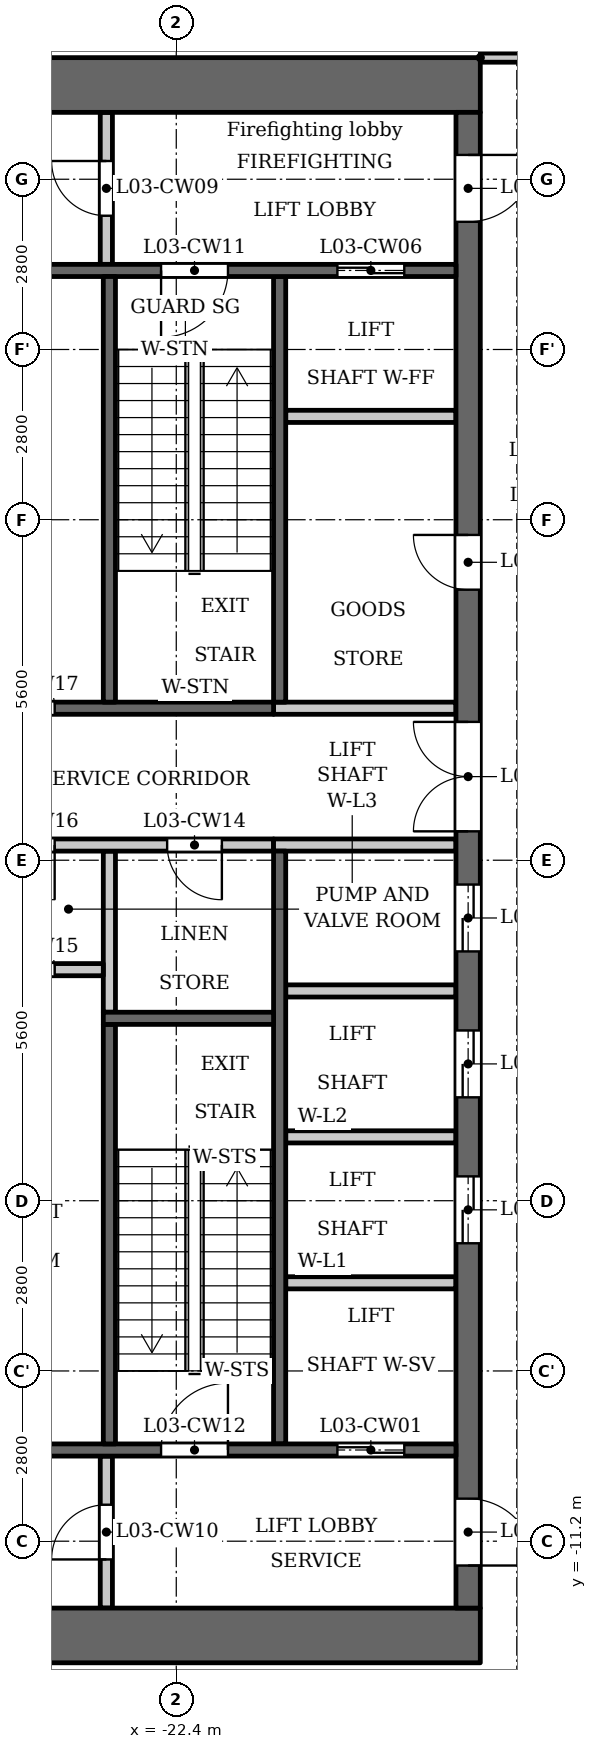
"""IFC4 building model, lengths in metres.
Left out: names, types, materials, properties, quantities, classifications, styles, units other than length and angle.
Written with IfcOpenShell. Run it as: python <this file> out.ifc"""

import sys

from ifc_helpers import new_model, si_unit, direction, frame, frame_2d, origin, place, context, subcontext, project, spatial, rectangle, extrude, element, fill, save


model = new_model("IFC4")
c1 = context("Model", 3, precision=1e-05, world=origin(), true_north=direction((0.0, 1.0)))
c2 = subcontext(c1, "Body", "Model", "MODEL_VIEW")
j1 = project(units=[si_unit("LENGTHUNIT", "METRE"), si_unit("PLANEANGLEUNIT", "RADIAN")], contexts=[c1])
p1 = place(None, origin())
s1 = spatial("IfcSite", under=j1, at=p1, CompositionType="ELEMENT")
p2 = place(p1, origin())
s2 = spatial("IfcBuilding", under=s1, at=p2, CompositionType="ELEMENT")
p3 = place(p2, frame((0.0, 0.0, 16.1)))
s3 = spatial("IfcBuildingStorey", under=s2, at=p3, CompositionType="ELEMENT", Elevation=16.1)
p4 = place(p3, frame((-23.5, -2.5, 0.0), z_axis=(0.0, 0.0, 1.0), x_axis=(0.0, 1.0, 0.0)))
e1 = element("IfcWall", 1, at=p4, inside=s3, PredefinedType="PARTITIONING", context=c2, shape_type="SweptSolid", body=[
    extrude(rectangle(XDim=2.65, YDim=0.2, at=frame_2d((1.325, 0.0))), origin(), (0.0, 0.0, 1.0), 4.45),
])
p5 = place(p3, frame((-20.7, 2.6, 0.0), z_axis=(0.0, 0.0, 1.0), x_axis=(0.0, 1.0, 0.0)))
e2 = element("IfcWall", 2, at=p5, inside=s3, PredefinedType="SHEAR", context=c2, shape_type="SweptSolid", body=[
    extrude(rectangle(XDim=7.0, YDim=0.2, at=frame_2d((3.5, 0.0))), origin(), (0.0, 0.0, 1.0), 4.45),
])
p6 = place(p3, frame((-20.7, -9.6, 0.0), z_axis=(0.0, 0.0, 1.0), x_axis=(0.0, 1.0, 0.0)))
e3 = element("IfcWall", 3, at=p6, inside=s3, PredefinedType="SHEAR", context=c2, shape_type="SweptSolid", body=[
    extrude(rectangle(XDim=9.75, YDim=0.2, at=frame_2d((4.875, 0.0))), origin(), (0.0, 0.0, 1.0), 4.45),
])
p7 = place(p3, frame((-20.8, 2.5, 0.0), z_axis=(0.0, 0.0, 1.0), x_axis=(-1.0, 0.0, 0.0)))
e4 = element("IfcWall", 4, at=p7, inside=s3, PredefinedType="SHEAR", context=c2, shape_type="SweptSolid", body=[
    extrude(rectangle(XDim=5.3, YDim=0.2, at=frame_2d((2.65, 0.0))), origin(), (0.0, 0.0, 1.0), 4.45),
])
p8 = place(p7, frame((3.6, 0.0, 0.0)))
e5 = element("IfcOpeningElement", 5, at=p8, cuts=e4, PredefinedType="OPENING", context=c2, shape_type="SweptSolid", body=[
    extrude(rectangle(XDim=0.9, YDim=2.1, at=frame_2d((0.45, 1.05))), frame((0.0, 0.11, 0.0), z_axis=(0.0, -1.0, 0.0), x_axis=(1.0, 0.0, 0.0)), (0.0, 0.0, 1.0), 0.22),
])
p9 = place(p3, frame((-20.8, 0.25, 0.0), z_axis=(0.0, 0.0, 1.0), x_axis=(-1.0, 0.0, 0.0)))
e6 = element("IfcWall", 6, at=p9, inside=s3, PredefinedType="PARTITIONING", context=c2, shape_type="SweptSolid", body=[
    extrude(rectangle(XDim=5.3, YDim=0.2, at=frame_2d((2.65, 0.0))), origin(), (0.0, 0.0, 1.0), 4.45),
])
p10 = place(p9, frame((0.85, 0.0, 0.0)))
e7 = element("IfcOpeningElement", 7, at=p10, cuts=e6, PredefinedType="OPENING", context=c2, shape_type="SweptSolid", body=[
    extrude(rectangle(XDim=0.9, YDim=2.1, at=frame_2d((0.45, 1.05))), frame((0.0, 0.11, 0.0), z_axis=(0.0, -1.0, 0.0), x_axis=(1.0, 0.0, 0.0)), (0.0, 0.0, 1.0), 0.22),
])
p11 = place(p9, frame((3.6, 0.0, 0.0)))
e8 = element("IfcOpeningElement", 8, at=p11, cuts=e6, PredefinedType="OPENING", context=c2, shape_type="SweptSolid", body=[
    extrude(rectangle(XDim=0.9, YDim=2.1, at=frame_2d((0.45, 1.05))), frame((0.0, 0.11, 0.0), z_axis=(0.0, -1.0, 0.0), x_axis=(1.0, 0.0, 0.0)), (0.0, 0.0, 1.0), 0.22),
])
for number, where, z_axis, x_axis in (
    (9, (-17.4, 12.75, 0.0), (0.0, 0.0, 1.0), (-1.0, 0.0, 0.0)),
    (10, (-17.4, -12.75, 0.0), (0.0, 0.0, 1.0), (-1.0, 0.0, 0.0)),
):
    element("IfcWall", number, at=place(p3, frame(where, z_axis=z_axis, x_axis=x_axis)), inside=s3, PredefinedType="SHEAR", context=c2, shape_type="SweptSolid", body=[
        extrude(rectangle(XDim=10.4, YDim=0.9, at=frame_2d((5.2, 0.0))), origin(), (0.0, 0.0, 1.0), 4.45),
    ])
p12 = place(p3, frame((-17.6, -12.3, 0.0), z_axis=(0.0, 0.0, 1.0), x_axis=(0.0, 1.0, 0.0)))
e11 = element("IfcWall", 11, at=p12, inside=s3, PredefinedType="SHEAR", context=c2, shape_type="SweptSolid", body=[
    extrude(rectangle(XDim=24.6, YDim=0.4, at=frame_2d((12.3, 0.0))), origin(), (0.0, 0.0, 1.0), 4.45),
])
p13 = place(p12, frame((6.0, 0.0, 0.0)))
e12 = element("IfcOpeningElement", 12, at=p13, cuts=e11, PredefinedType="OPENING", context=c2, shape_type="SweptSolid", body=[
    extrude(rectangle(XDim=1.1, YDim=2.1, at=frame_2d((0.55, 1.05))), frame((0.0, 0.21, 0.0), z_axis=(0.0, -1.0, 0.0), x_axis=(1.0, 0.0, 0.0)), (0.0, 0.0, 1.0), 0.42),
])
p14 = place(p12, frame((8.4, 0.0, 0.0)))
e13 = element("IfcOpeningElement", 13, at=p14, cuts=e11, PredefinedType="OPENING", context=c2, shape_type="SweptSolid", body=[
    extrude(rectangle(XDim=1.1, YDim=2.1, at=frame_2d((0.55, 1.05))), frame((0.0, 0.21, 0.0), z_axis=(0.0, -1.0, 0.0), x_axis=(1.0, 0.0, 0.0)), (0.0, 0.0, 1.0), 0.42),
])
p15 = place(p12, frame((10.8, 0.0, 0.0)))
e14 = element("IfcOpeningElement", 14, at=p15, cuts=e11, PredefinedType="OPENING", context=c2, shape_type="SweptSolid", body=[
    extrude(rectangle(XDim=1.1, YDim=2.1, at=frame_2d((0.55, 1.05))), frame((0.0, 0.21, 0.0), z_axis=(0.0, -1.0, 0.0), x_axis=(1.0, 0.0, 0.0)), (0.0, 0.0, 1.0), 0.42),
])
p16 = place(p12, frame((16.75, 0.0, 0.0)))
e15 = element("IfcOpeningElement", 15, at=p16, cuts=e11, PredefinedType="OPENING", context=c2, shape_type="SweptSolid", body=[
    extrude(rectangle(XDim=0.9, YDim=2.1, at=frame_2d((0.45, 1.05))), frame((0.0, 0.21, 0.0), z_axis=(0.0, -1.0, 0.0), x_axis=(1.0, 0.0, 0.0)), (0.0, 0.0, 1.0), 0.42),
])
p17 = place(p12, frame((22.8, 0.0, 0.0)))
e16 = element("IfcOpeningElement", 16, at=p17, cuts=e11, PredefinedType="OPENING", context=c2, shape_type="SweptSolid", body=[
    extrude(rectangle(XDim=1.1, YDim=2.1, at=frame_2d((0.55, 1.05))), frame((0.0, 0.21, 0.0), z_axis=(0.0, -1.0, 0.0), x_axis=(1.0, 0.0, 0.0)), (0.0, 0.0, 1.0), 0.42),
])
p18 = place(p12, frame((0.7, 0.0, 0.0)))
e17 = element("IfcOpeningElement", 17, at=p18, cuts=e11, PredefinedType="OPENING", context=c2, shape_type="SweptSolid", body=[
    extrude(rectangle(XDim=1.1, YDim=2.1, at=frame_2d((0.55, 1.05))), frame((0.0, 0.21, 0.0), z_axis=(0.0, -1.0, 0.0), x_axis=(1.0, 0.0, 0.0)), (0.0, 0.0, 1.0), 0.42),
])
p19 = place(p12, frame((12.775, 0.0, 0.0)))
e18 = element("IfcOpeningElement", 18, at=p19, cuts=e11, PredefinedType="OPENING", context=c2, shape_type="SweptSolid", body=[
    extrude(rectangle(XDim=1.8, YDim=2.1, at=frame_2d((0.9, 1.05))), frame((0.0, 0.21, 0.0), z_axis=(0.0, -1.0, 0.0), x_axis=(1.0, 0.0, 0.0)), (0.0, 0.0, 1.0), 0.42),
])
p20 = place(p3, frame((-23.55, 9.8, 0.0), z_axis=(0.0, 0.0, 1.0), x_axis=(0.0, 1.0, 0.0)))
e19 = element("IfcWall", 19, at=p20, inside=s3, PredefinedType="PARTITIONING", context=c2, shape_type="SweptSolid", body=[
    extrude(rectangle(XDim=2.5, YDim=0.2, at=frame_2d((1.25, 0.0))), origin(), (0.0, 0.0, 1.0), 4.45),
])
p21 = place(p20, frame((0.8, 0.0, 0.0)))
e20 = element("IfcOpeningElement", 20, at=p21, cuts=e19, PredefinedType="OPENING", context=c2, shape_type="SweptSolid", body=[
    extrude(rectangle(XDim=0.9, YDim=2.1, at=frame_2d((0.45, 1.05))), frame((0.0, 0.11, 0.0), z_axis=(0.0, -1.0, 0.0), x_axis=(1.0, 0.0, 0.0)), (0.0, 0.0, 1.0), 0.22),
])
p22 = place(p3, frame((-23.55, -12.3, 0.0), z_axis=(0.0, 0.0, 1.0), x_axis=(0.0, 1.0, 0.0)))
e21 = element("IfcWall", 21, at=p22, inside=s3, PredefinedType="PARTITIONING", context=c2, shape_type="SweptSolid", body=[
    extrude(rectangle(XDim=2.5, YDim=0.2, at=frame_2d((1.25, 0.0))), origin(), (0.0, 0.0, 1.0), 4.45),
])
p23 = place(p22, frame((0.8, 0.0, 0.0)))
e22 = element("IfcOpeningElement", 22, at=p23, cuts=e21, PredefinedType="OPENING", context=c2, shape_type="SweptSolid", body=[
    extrude(rectangle(XDim=0.9, YDim=2.1, at=frame_2d((0.45, 1.05))), frame((0.0, 0.11, 0.0), z_axis=(0.0, -1.0, 0.0), x_axis=(1.0, 0.0, 0.0)), (0.0, 0.0, 1.0), 0.22),
])
p24 = place(p3, frame((-23.6, -1.8, 0.0), z_axis=(0.0, 0.0, 1.0), x_axis=(-1.0, 0.0, 0.0)))
e23 = element("IfcWall", 23, at=p24, inside=s3, PredefinedType="PARTITIONING", context=c2, shape_type="SweptSolid", body=[
    extrude(rectangle(XDim=2.5, YDim=0.2, at=frame_2d((1.25, 0.0))), origin(), (0.0, 0.0, 1.0), 4.45),
])
p25 = place(p24, frame((0.8, 0.0, 0.0)))
e24 = element("IfcOpeningElement", 24, at=p25, cuts=e23, PredefinedType="OPENING", context=c2, shape_type="SweptSolid", body=[
    extrude(rectangle(XDim=0.9, YDim=2.1, at=frame_2d((0.45, 1.05))), frame((0.0, 0.11, 0.0), z_axis=(0.0, -1.0, 0.0), x_axis=(1.0, 0.0, 0.0)), (0.0, 0.0, 1.0), 0.22),
])
p26 = place(p3, frame((-17.8, -9.7, 0.0), z_axis=(0.0, 0.0, 1.0), x_axis=(-1.0, 0.0, 0.0)))
e25 = element("IfcWall", 25, at=p26, inside=s3, PredefinedType="SHEAR", context=c2, shape_type="SweptSolid", body=[
    extrude(rectangle(XDim=8.3, YDim=0.2, at=frame_2d((4.15, 0.0))), origin(), (0.0, 0.0, 1.0), 4.45),
])
p27 = place(p26, frame((0.85, 0.0, 0.0)))
e26 = element("IfcOpeningElement", 26, at=p27, cuts=e25, PredefinedType="OPENING", context=c2, shape_type="SweptSolid", body=[
    extrude(rectangle(XDim=1.1, YDim=2.1, at=frame_2d((0.55, 1.05))), frame((0.0, 0.11, 0.0), z_axis=(0.0, -1.0, 0.0), x_axis=(1.0, 0.0, 0.0)), (0.0, 0.0, 1.0), 0.22),
])
p28 = place(p26, frame((3.75, 0.0, 0.0)))
e27 = element("IfcOpeningElement", 27, at=p28, cuts=e25, PredefinedType="OPENING", context=c2, shape_type="SweptSolid", body=[
    extrude(rectangle(XDim=1.1, YDim=2.1, at=frame_2d((0.55, 1.05))), frame((0.0, 0.11, 0.0), z_axis=(0.0, -1.0, 0.0), x_axis=(1.0, 0.0, 0.0)), (0.0, 0.0, 1.0), 0.22),
])
for number, where, z_axis, x_axis in (
    (28, (-17.8, -6.95, 0.0), (0.0, 0.0, 1.0), (-1.0, 0.0, 0.0)),
    (29, (-17.8, -4.55, 0.0), (0.0, 0.0, 1.0), (-1.0, 0.0, 0.0)),
    (30, (-17.8, -2.15, 0.0), (0.0, 0.0, 1.0), (-1.0, 0.0, 0.0)),
):
    element("IfcWall", number, at=place(p3, frame(where, z_axis=z_axis, x_axis=x_axis)), inside=s3, PredefinedType="PARTITIONING", context=c2, shape_type="SweptSolid", body=[
        extrude(rectangle(XDim=2.8, YDim=0.2, at=frame_2d((1.4, 0.0))), origin(), (0.0, 0.0, 1.0), 4.45),
    ])
for number, where, z_axis, x_axis in (
    (31, (-17.8, 0.25, 0.0), (0.0, 0.0, 1.0), (-1.0, 0.0, 0.0)),
    (32, (-17.8, 2.5, 0.0), (0.0, 0.0, 1.0), (-1.0, 0.0, 0.0)),
):
    element("IfcWall", number, at=place(p3, frame(where, z_axis=z_axis, x_axis=x_axis)), inside=s3, PredefinedType="PARTITIONING", context=c2, shape_type="SweptSolid", body=[
        extrude(rectangle(XDim=3.0, YDim=0.2, at=frame_2d((1.5, 0.0))), origin(), (0.0, 0.0, 1.0), 4.45),
    ])
p29 = place(p3, frame((-17.8, 7.3, 0.0), z_axis=(0.0, 0.0, 1.0), x_axis=(-1.0, 0.0, 0.0)))
e33 = element("IfcWall", 33, at=p29, inside=s3, PredefinedType="PARTITIONING", context=c2, shape_type="SweptSolid", body=[
    extrude(rectangle(XDim=2.8, YDim=0.2, at=frame_2d((1.4, 0.0))), origin(), (0.0, 0.0, 1.0), 4.45),
])
p30 = place(p3, frame((-17.8, 9.7, 0.0), z_axis=(0.0, 0.0, 1.0), x_axis=(-1.0, 0.0, 0.0)))
e34 = element("IfcWall", 34, at=p30, inside=s3, PredefinedType="SHEAR", context=c2, shape_type="SweptSolid", body=[
    extrude(rectangle(XDim=8.3, YDim=0.2, at=frame_2d((4.15, 0.0))), origin(), (0.0, 0.0, 1.0), 4.45),
])
p31 = place(p30, frame((0.85, 0.0, 0.0)))
e35 = element("IfcOpeningElement", 35, at=p31, cuts=e34, PredefinedType="OPENING", context=c2, shape_type="SweptSolid", body=[
    extrude(rectangle(XDim=1.1, YDim=2.1, at=frame_2d((0.55, 1.05))), frame((0.0, 0.11, 0.0), z_axis=(0.0, -1.0, 0.0), x_axis=(1.0, 0.0, 0.0)), (0.0, 0.0, 1.0), 0.22),
])
p32 = place(p30, frame((3.75, 0.0, 0.0)))
e36 = element("IfcOpeningElement", 36, at=p32, cuts=e34, PredefinedType="OPENING", context=c2, shape_type="SweptSolid", body=[
    extrude(rectangle(XDim=1.1, YDim=2.1, at=frame_2d((0.55, 1.05))), frame((0.0, 0.11, 0.0), z_axis=(0.0, -1.0, 0.0), x_axis=(1.0, 0.0, 0.0)), (0.0, 0.0, 1.0), 0.22),
])
p33 = place(p3, frame((-23.5, 2.6, 0.0), z_axis=(0.0, 0.0, 1.0), x_axis=(0.0, 1.0, 0.0)))
e37 = element("IfcWall", 37, at=p33, inside=s3, PredefinedType="SHEAR", context=c2, shape_type="SweptSolid", body=[
    extrude(rectangle(XDim=7.0, YDim=0.2, at=frame_2d((3.5, 0.0))), origin(), (0.0, 0.0, 1.0), 4.45),
])
p34 = place(p3, frame((-23.5, -9.6, 0.0), z_axis=(0.0, 0.0, 1.0), x_axis=(0.0, 1.0, 0.0)))
e38 = element("IfcWall", 38, at=p34, inside=s3, PredefinedType="SHEAR", context=c2, shape_type="SweptSolid", body=[
    extrude(rectangle(XDim=6.9, YDim=0.2, at=frame_2d((3.45, 0.0))), origin(), (0.0, 0.0, 1.0), 4.45),
])
p35 = place(p3, frame((-20.8, -2.6, 0.0), z_axis=(0.0, 0.0, 1.0), x_axis=(-1.0, 0.0, 0.0)))
e39 = element("IfcWall", 39, at=p35, inside=s3, PredefinedType="SHEAR", context=c2, shape_type="SweptSolid", body=[
    extrude(rectangle(XDim=2.8, YDim=0.2, at=frame_2d((1.4, 0.0))), origin(), (0.0, 0.0, 1.0), 4.45),
])
p36 = place(p3, frame((-17.4, 13.2, 0.0), z_axis=(0.0, 0.0, 1.0), x_axis=(1.0, 0.0, 0.0)))
e40 = element("IfcWall", 40, at=p36, inside=s3, PredefinedType="PARTITIONING", context=c2, shape_type="SweptSolid", body=[
    extrude(rectangle(XDim=34.8, YDim=0.15, at=frame_2d((17.4, 0.0))), origin(), (0.0, 0.0, 1.0), 4.45),
])
p37 = place(p36, frame((3.05, 0.0, 0.0)))
e41 = element("IfcOpeningElement", 41, at=p37, cuts=e40, PredefinedType="OPENING", context=c2, shape_type="SweptSolid", body=[
    extrude(rectangle(XDim=1.8, YDim=2.1, at=frame_2d((0.9, 1.05))), frame((0.0, 0.085, 0.0), z_axis=(0.0, -1.0, 0.0), x_axis=(1.0, 0.0, 0.0)), (0.0, 0.0, 1.0), 0.17),
])
p38 = place(p36, frame((0.75, 0.0, 0.0)))
e42 = element("IfcOpeningElement", 42, at=p38, cuts=e40, PredefinedType="OPENING", context=c2, shape_type="SweptSolid", body=[
    extrude(rectangle(XDim=1.0, YDim=2.1, at=frame_2d((0.5, 1.05))), frame((0.0, 0.085, 0.0), z_axis=(0.0, -1.0, 0.0), x_axis=(1.0, 0.0, 0.0)), (0.0, 0.0, 1.0), 0.17),
])
p39 = place(p36, frame((33.15, 0.0, 0.0)))
e43 = element("IfcOpeningElement", 43, at=p39, cuts=e40, PredefinedType="OPENING", context=c2, shape_type="SweptSolid", body=[
    extrude(rectangle(XDim=1.0, YDim=2.1, at=frame_2d((0.5, 1.05))), frame((0.0, 0.085, 0.0), z_axis=(0.0, -1.0, 0.0), x_axis=(1.0, 0.0, 0.0)), (0.0, 0.0, 1.0), 0.17),
])
p40 = place(p27, origin())
e44 = element("IfcDoor", 44, at=p40, inside=s3, OperationType="DOUBLE_DOOR_SLIDING", PredefinedType="DOOR", context=c2, shape_type="SweptSolid", body=[
    extrude(rectangle(XDim=1.1, YDim=2.1, at=frame_2d((0.55, 1.05))), frame((0.0, 0.025, 0.0), z_axis=(0.0, -1.0, 0.0), x_axis=(1.0, 0.0, 0.0)), (0.0, 0.0, 1.0), 0.05),
])
fill(e26, e44)
p41 = place(p13, origin())
e45 = element("IfcDoor", 45, at=p41, inside=s3, OperationType="DOUBLE_DOOR_SLIDING", PredefinedType="DOOR", context=c2, shape_type="SweptSolid", body=[
    extrude(rectangle(XDim=1.1, YDim=2.1, at=frame_2d((0.55, 1.05))), frame((0.0, 0.025, 0.0), z_axis=(0.0, -1.0, 0.0), x_axis=(1.0, 0.0, 0.0)), (0.0, 0.0, 1.0), 0.05),
])
fill(e12, e45)
p42 = place(p14, origin())
e46 = element("IfcDoor", 46, at=p42, inside=s3, OperationType="DOUBLE_DOOR_SLIDING", PredefinedType="DOOR", context=c2, shape_type="SweptSolid", body=[
    extrude(rectangle(XDim=1.1, YDim=2.1, at=frame_2d((0.55, 1.05))), frame((0.0, 0.025, 0.0), z_axis=(0.0, -1.0, 0.0), x_axis=(1.0, 0.0, 0.0)), (0.0, 0.0, 1.0), 0.05),
])
fill(e13, e46)
p43 = place(p15, origin())
e47 = element("IfcDoor", 47, at=p43, inside=s3, OperationType="DOUBLE_DOOR_SLIDING", PredefinedType="DOOR", context=c2, shape_type="SweptSolid", body=[
    extrude(rectangle(XDim=1.1, YDim=2.1, at=frame_2d((0.55, 1.05))), frame((0.0, 0.025, 0.0), z_axis=(0.0, -1.0, 0.0), x_axis=(1.0, 0.0, 0.0)), (0.0, 0.0, 1.0), 0.05),
])
fill(e14, e47)
p44 = place(p16, origin())
e48 = element("IfcDoor", 48, at=p44, inside=s3, OperationType="SINGLE_SWING_LEFT", PredefinedType="DOOR", context=c2, shape_type="SweptSolid", body=[
    extrude(rectangle(XDim=0.9, YDim=2.1, at=frame_2d((0.45, 1.05))), frame((0.0, 0.025, 0.0), z_axis=(0.0, -1.0, 0.0), x_axis=(1.0, 0.0, 0.0)), (0.0, 0.0, 1.0), 0.05),
])
fill(e15, e48)
p45 = place(p31, origin())
e49 = element("IfcDoor", 49, at=p45, inside=s3, OperationType="DOUBLE_DOOR_SLIDING", PredefinedType="DOOR", context=c2, shape_type="SweptSolid", body=[
    extrude(rectangle(XDim=1.1, YDim=2.1, at=frame_2d((0.55, 1.05))), frame((0.0, 0.025, 0.0), z_axis=(0.0, -1.0, 0.0), x_axis=(1.0, 0.0, 0.0)), (0.0, 0.0, 1.0), 0.05),
])
fill(e35, e49)
p46 = place(p17, origin())
e50 = element("IfcDoor", 50, at=p46, inside=s3, OperationType="SINGLE_SWING_RIGHT", PredefinedType="DOOR", context=c2, shape_type="SweptSolid", body=[
    extrude(rectangle(XDim=1.1, YDim=2.1, at=frame_2d((0.55, 1.05))), frame((0.0, 0.025, 0.0), z_axis=(0.0, -1.0, 0.0), x_axis=(1.0, 0.0, 0.0)), (0.0, 0.0, 1.0), 0.05),
])
fill(e16, e50)
p47 = place(p18, origin())
e51 = element("IfcDoor", 51, at=p47, inside=s3, OperationType="SINGLE_SWING_LEFT", PredefinedType="DOOR", context=c2, shape_type="SweptSolid", body=[
    extrude(rectangle(XDim=1.1, YDim=2.1, at=frame_2d((0.55, 1.05))), frame((0.0, 0.025, 0.0), z_axis=(0.0, -1.0, 0.0), x_axis=(1.0, 0.0, 0.0)), (0.0, 0.0, 1.0), 0.05),
])
fill(e17, e51)
p48 = place(p21, origin())
e52 = element("IfcDoor", 52, at=p48, inside=s3, OperationType="SINGLE_SWING_LEFT", PredefinedType="DOOR", context=c2, shape_type="SweptSolid", body=[
    extrude(rectangle(XDim=0.9, YDim=2.1, at=frame_2d((0.45, 1.05))), frame((0.0, 0.025, 0.0), z_axis=(0.0, -1.0, 0.0), x_axis=(1.0, 0.0, 0.0)), (0.0, 0.0, 1.0), 0.05),
])
fill(e20, e52)
p49 = place(p23, origin())
e53 = element("IfcDoor", 53, at=p49, inside=s3, OperationType="SINGLE_SWING_RIGHT", PredefinedType="DOOR", context=c2, shape_type="SweptSolid", body=[
    extrude(rectangle(XDim=0.9, YDim=2.1, at=frame_2d((0.45, 1.05))), frame((0.0, 0.025, 0.0), z_axis=(0.0, -1.0, 0.0), x_axis=(1.0, 0.0, 0.0)), (0.0, 0.0, 1.0), 0.05),
])
fill(e22, e53)
p50 = place(p32, origin())
e54 = element("IfcDoor", 54, at=p50, inside=s3, OperationType="SINGLE_SWING_LEFT", PredefinedType="DOOR", context=c2, shape_type="SweptSolid", body=[
    extrude(rectangle(XDim=1.1, YDim=2.1, at=frame_2d((0.55, 1.05))), frame((0.0, 0.025, 0.0), z_axis=(0.0, -1.0, 0.0), x_axis=(1.0, 0.0, 0.0)), (0.0, 0.0, 1.0), 0.05),
])
fill(e36, e54)
p51 = place(p28, origin())
e55 = element("IfcDoor", 55, at=p51, inside=s3, OperationType="SINGLE_SWING_LEFT", PredefinedType="DOOR", context=c2, shape_type="SweptSolid", body=[
    extrude(rectangle(XDim=1.1, YDim=2.1, at=frame_2d((0.55, 1.05))), frame((0.0, 0.025, 0.0), z_axis=(0.0, -1.0, 0.0), x_axis=(1.0, 0.0, 0.0)), (0.0, 0.0, 1.0), 0.05),
])
fill(e27, e55)
p52 = place(p19, origin())
e56 = element("IfcDoor", 56, at=p52, inside=s3, OperationType="DOUBLE_DOOR_SINGLE_SWING", PredefinedType="DOOR", context=c2, shape_type="SweptSolid", body=[
    extrude(rectangle(XDim=1.8, YDim=2.1, at=frame_2d((0.9, 1.05))), frame((0.0, 0.025, 0.0), z_axis=(0.0, -1.0, 0.0), x_axis=(1.0, 0.0, 0.0)), (0.0, 0.0, 1.0), 0.05),
])
fill(e18, e56)
p53 = place(p10, origin())
e57 = element("IfcDoor", 57, at=p53, inside=s3, OperationType="SINGLE_SWING_RIGHT", PredefinedType="DOOR", context=c2, shape_type="SweptSolid", body=[
    extrude(rectangle(XDim=0.9, YDim=2.1, at=frame_2d((0.45, 1.05))), frame((0.0, 0.025, 0.0), z_axis=(0.0, -1.0, 0.0), x_axis=(1.0, 0.0, 0.0)), (0.0, 0.0, 1.0), 0.05),
])
fill(e7, e57)
p54 = place(p25, origin())
e58 = element("IfcDoor", 58, at=p54, inside=s3, OperationType="SINGLE_SWING_RIGHT", PredefinedType="DOOR", context=c2, shape_type="SweptSolid", body=[
    extrude(rectangle(XDim=0.9, YDim=2.1, at=frame_2d((0.45, 1.05))), frame((0.0, 0.025, 0.0), z_axis=(0.0, -1.0, 0.0), x_axis=(1.0, 0.0, 0.0)), (0.0, 0.0, 1.0), 0.05),
])
fill(e24, e58)
p55 = place(p11, origin())
e59 = element("IfcDoor", 59, at=p55, inside=s3, OperationType="SINGLE_SWING_RIGHT", PredefinedType="DOOR", context=c2, shape_type="SweptSolid", body=[
    extrude(rectangle(XDim=0.9, YDim=2.1, at=frame_2d((0.45, 1.05))), frame((0.0, 0.025, 0.0), z_axis=(0.0, -1.0, 0.0), x_axis=(1.0, 0.0, 0.0)), (0.0, 0.0, 1.0), 0.05),
])
fill(e8, e59)
p56 = place(p8, origin())
e60 = element("IfcDoor", 60, at=p56, inside=s3, OperationType="SINGLE_SWING_RIGHT", PredefinedType="DOOR", context=c2, shape_type="SweptSolid", body=[
    extrude(rectangle(XDim=0.9, YDim=2.1, at=frame_2d((0.45, 1.05))), frame((0.0, 0.025, 0.0), z_axis=(0.0, -1.0, 0.0), x_axis=(1.0, 0.0, 0.0)), (0.0, 0.0, 1.0), 0.05),
])
fill(e5, e60)
save(model, sys.argv[1])
